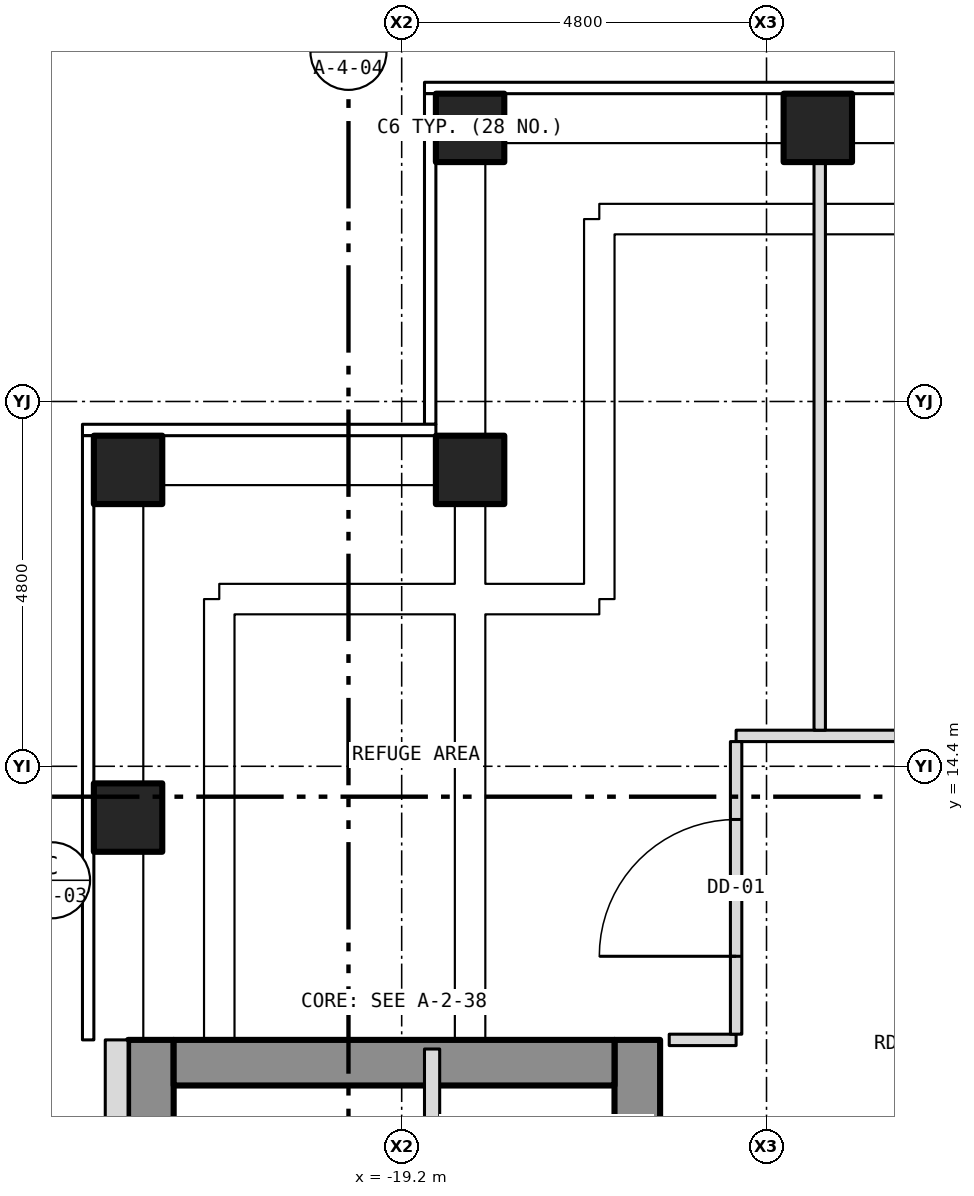
"""IFC4 building model, lengths in metres.
Left out: names, types, materials, properties, quantities, classifications, styles, units other than length and angle.
Written with IfcOpenShell. Run it as: python <this file> out.ifc"""

import sys

from ifc_helpers import new_model, si_unit, direction, frame, frame_2d, origin, origin_2d, place, context, subcontext, project, spatial, rectangle, hollow_rectangle, extrude, element, fill, save


model = new_model("IFC4")
c1 = context("Model", 3, precision=1e-05, world=origin(), true_north=direction((0.0, 1.0)))
c2 = subcontext(c1, "Body", "Model", "MODEL_VIEW")
j1 = project(units=[si_unit("LENGTHUNIT", "METRE"), si_unit("PLANEANGLEUNIT", "RADIAN")], contexts=[c1])
p1 = place(None, origin())
s1 = spatial("IfcSite", under=j1, at=p1, CompositionType="ELEMENT")
p2 = place(p1, origin())
s2 = spatial("IfcBuilding", under=s1, at=p2, CompositionType="ELEMENT")
p3 = place(p2, frame((0.0, 0.0, 138.0)))
s3 = spatial("IfcBuildingStorey", under=s2, at=p3, CompositionType="ELEMENT", Elevation=138.0)
for number, where, z_axis, x_axis in (
    (1, (-18.3, 22.8, -0.3), (0.0, 0.0, 1.0), (1.0, 0.0, 0.0)),
    (2, (-13.725, 22.8, -0.3), (0.0, 0.0, 1.0), (1.0, 0.0, 0.0)),
    (3, (-22.8, 13.725, -0.3), (0.0, 0.0, 1.0), (1.0, 0.0, 0.0)),
    (4, (-22.8, 18.3, -0.3), (0.0, 0.0, 1.0), (1.0, 0.0, 0.0)),
    (5, (-18.3, 18.3, -0.3), (0.0, 0.0, 1.0), (1.0, 0.0, 0.0)),
):
    element("IfcColumn", number, at=place(p3, frame(where, z_axis=z_axis, x_axis=x_axis)), inside=s3, PredefinedType="COLUMN", context=c2, shape_type="SweptSolid", body=[
        extrude(hollow_rectangle(XDim=0.9, YDim=0.9, WallThickness=0.05, at=origin_2d()), origin(), (0.0, 0.0, 1.0), 4.6),
    ])
p4 = place(p3, frame((-16.1, -10.8, 0.0), z_axis=(0.0, 0.0, 1.0), x_axis=(0.0, 1.0, 0.0)))
e6 = element("IfcWall", 6, at=p4, inside=s3, PredefinedType="SHEAR", context=c2, shape_type="SweptSolid", body=[
    extrude(rectangle(XDim=21.6, YDim=0.6, at=frame_2d((10.8, 0.0))), origin(), (0.0, 0.0, 1.0), 3.9),
])
p5 = place(p4, frame((9.4, 0.0, 0.0)))
e7 = element("IfcOpeningElement", 7, at=p5, cuts=e6, PredefinedType="OPENING", context=c2, shape_type="SweptSolid", body=[
    extrude(rectangle(XDim=1.1, YDim=2.1, at=frame_2d((0.55, 1.05))), frame((0.0, 0.312, 0.0), z_axis=(0.0, -1.0, 0.0), x_axis=(1.0, 0.0, 0.0)), (0.0, 0.0, 1.0), 0.624),
])
p6 = place(p4, frame((11.5, 0.0, 0.0)))
e8 = element("IfcOpeningElement", 8, at=p6, cuts=e6, PredefinedType="OPENING", context=c2, shape_type="SweptSolid", body=[
    extrude(rectangle(XDim=1.1, YDim=2.1, at=frame_2d((0.55, 1.05))), frame((0.0, 0.312, 0.0), z_axis=(0.0, -1.0, 0.0), x_axis=(1.0, 0.0, 0.0)), (0.0, 0.0, 1.0), 0.624),
])
p7 = place(p4, frame((0.758, 0.0, 0.0)))
e9 = element("IfcOpeningElement", 9, at=p7, cuts=e6, PredefinedType="OPENING", context=c2, shape_type="SweptSolid", body=[
    extrude(rectangle(XDim=1.1, YDim=2.1, at=frame_2d((0.55, 1.05))), frame((0.0, 0.312, 0.0), z_axis=(0.0, -1.0, 0.0), x_axis=(1.0, 0.0, 0.0)), (0.0, 0.0, 1.0), 0.624),
])
p8 = place(p4, frame((7.5, 0.0, 0.0)))
e10 = element("IfcOpeningElement", 10, at=p8, cuts=e6, PredefinedType="OPENING", context=c2, shape_type="SweptSolid", body=[
    extrude(rectangle(XDim=1.1, YDim=2.1, at=frame_2d((0.55, 1.05))), frame((0.0, 0.312, 0.0), z_axis=(0.0, -1.0, 0.0), x_axis=(1.0, 0.0, 0.0)), (0.0, 0.0, 1.0), 0.624),
])
p9 = place(p3, frame((-22.5, -10.8, 0.0), z_axis=(0.0, 0.0, 1.0), x_axis=(0.0, 1.0, 0.0)))
e11 = element("IfcWall", 11, at=p9, inside=s3, PredefinedType="SHEAR", context=c2, shape_type="SweptSolid", body=[
    extrude(rectangle(XDim=21.6, YDim=0.6, at=frame_2d((10.8, 0.0))), origin(), (0.0, 0.0, 1.0), 3.9),
])
p10 = place(p3, frame((-22.2, 10.5, 0.0), z_axis=(0.0, 0.0, 1.0), x_axis=(1.0, 0.0, 0.0)))
e12 = element("IfcWall", 12, at=p10, inside=s3, PredefinedType="SHEAR", context=c2, shape_type="SweptSolid", body=[
    extrude(rectangle(XDim=5.8, YDim=0.6, at=frame_2d((2.9, 0.0))), origin(), (0.0, 0.0, 1.0), 3.9),
])
p11 = place(p3, frame((-22.95, 10.8, 0.0), z_axis=(0.0, 0.0, 1.0), x_axis=(0.0, -1.0, 0.0)))
e13 = element("IfcWall", 13, at=p11, inside=s3, PredefinedType="SOLIDWALL", context=c2, shape_type="SweptSolid", body=[
    extrude(rectangle(XDim=21.6, YDim=0.3, at=frame_2d((10.8, 0.0))), origin(), (0.0, 0.0, 1.0), 4.5),
])
p12 = place(p11, frame((3.0, 0.0, 2.2)))
e14 = element("IfcOpeningElement", 14, at=p12, cuts=e13, PredefinedType="OPENING", context=c2, shape_type="SweptSolid", body=[
    extrude(rectangle(XDim=1.2, YDim=0.6, at=frame_2d((0.6, 0.3))), frame((0.0, 0.162, 0.0), z_axis=(0.0, -1.0, 0.0), x_axis=(1.0, 0.0, 0.0)), (0.0, 0.0, 1.0), 0.324),
])
p13 = place(p11, frame((7.8, 0.0, 2.2)))
e15 = element("IfcOpeningElement", 15, at=p13, cuts=e13, PredefinedType="OPENING", context=c2, shape_type="SweptSolid", body=[
    extrude(rectangle(XDim=1.2, YDim=0.6, at=frame_2d((0.6, 0.3))), frame((0.0, 0.162, 0.0), z_axis=(0.0, -1.0, 0.0), x_axis=(1.0, 0.0, 0.0)), (0.0, 0.0, 1.0), 0.324),
])
p14 = place(p11, frame((12.6, 0.0, 2.2)))
e16 = element("IfcOpeningElement", 16, at=p14, cuts=e13, PredefinedType="OPENING", context=c2, shape_type="SweptSolid", body=[
    extrude(rectangle(XDim=1.2, YDim=0.6, at=frame_2d((0.6, 0.3))), frame((0.0, 0.162, 0.0), z_axis=(0.0, -1.0, 0.0), x_axis=(1.0, 0.0, 0.0)), (0.0, 0.0, 1.0), 0.324),
])
p15 = place(p11, frame((17.4, 0.0, 2.2)))
e17 = element("IfcOpeningElement", 17, at=p15, cuts=e13, PredefinedType="OPENING", context=c2, shape_type="SweptSolid", body=[
    extrude(rectangle(XDim=1.2, YDim=0.6, at=frame_2d((0.6, 0.3))), frame((0.0, 0.162, 0.0), z_axis=(0.0, -1.0, 0.0), x_axis=(1.0, 0.0, 0.0)), (0.0, 0.0, 1.0), 0.324),
])
p16 = place(p3, frame((-15.68, 10.8, 0.0), z_axis=(0.0, 0.0, 1.0), x_axis=(1.0, 0.0, 0.0)))
e18 = element("IfcWall", 18, at=p16, inside=s3, PredefinedType="PARTITIONING", context=c2, shape_type="SweptSolid", body=[
    extrude(rectangle(XDim=0.88, YDim=0.15, at=frame_2d((0.44, 0.0))), origin(), (0.0, 0.0, 1.0), 4.3),
])
p17 = place(p3, frame((-14.8, 14.8, 0.0), z_axis=(0.0, 0.0, 1.0), x_axis=(1.0, 0.0, 0.0)))
e19 = element("IfcWall", 19, at=p17, inside=s3, PredefinedType="PARTITIONING", context=c2, shape_type="SweptSolid", body=[
    extrude(rectangle(XDim=29.6, YDim=0.15, at=frame_2d((14.8, 0.0))), origin(), (0.0, 0.0, 1.0), 4.3),
])
p18 = place(p17, frame((7.488, 0.0, 0.0)))
e20 = element("IfcOpeningElement", 20, at=p18, cuts=e19, PredefinedType="OPENING", context=c2, shape_type="SweptSolid", body=[
    extrude(rectangle(XDim=0.9, YDim=2.1, at=frame_2d((0.45, 1.05))), frame((0.0, 0.087, 0.0), z_axis=(0.0, -1.0, 0.0), x_axis=(1.0, 0.0, 0.0)), (0.0, 0.0, 1.0), 0.174),
])
p19 = place(p17, frame((21.213, 0.0, 0.0)))
e21 = element("IfcOpeningElement", 21, at=p19, cuts=e19, PredefinedType="OPENING", context=c2, shape_type="SweptSolid", body=[
    extrude(rectangle(XDim=0.9, YDim=2.1, at=frame_2d((0.45, 1.05))), frame((0.0, 0.087, 0.0), z_axis=(0.0, -1.0, 0.0), x_axis=(1.0, 0.0, 0.0)), (0.0, 0.0, 1.0), 0.174),
])
p20 = place(p3, frame((-18.8, -1.8, 0.0), z_axis=(0.0, 0.0, 1.0), x_axis=(0.0, 1.0, 0.0)))
e22 = element("IfcWall", 22, at=p20, inside=s3, PredefinedType="PARTITIONING", context=c2, shape_type="SweptSolid", body=[
    extrude(rectangle(XDim=12.48, YDim=0.2, at=frame_2d((6.24, 0.0))), origin(), (0.0, 0.0, 1.0), 3.9),
])
p21 = place(p3, frame((-14.8, 10.875, 0.0), z_axis=(0.0, 0.0, 1.0), x_axis=(0.0, 1.0, 0.0)))
e23 = element("IfcWall", 23, at=p21, inside=s3, PredefinedType="PARTITIONING", context=c2, shape_type="SweptSolid", body=[
    extrude(rectangle(XDim=3.85, YDim=0.15, at=frame_2d((1.925, 0.0))), origin(), (0.0, 0.0, 1.0), 4.3),
])
p22 = place(p21, frame((1.025, 0.0, 0.0)))
e24 = element("IfcOpeningElement", 24, at=p22, cuts=e23, PredefinedType="OPENING", context=c2, shape_type="SweptSolid", body=[
    extrude(rectangle(XDim=1.8, YDim=2.1, at=frame_2d((0.9, 1.05))), frame((0.0, 0.087, 0.0), z_axis=(0.0, -1.0, 0.0), x_axis=(1.0, 0.0, 0.0)), (0.0, 0.0, 1.0), 0.174),
])
p23 = place(p3, frame((-13.7, 14.875, 0.0), z_axis=(0.0, 0.0, 1.0), x_axis=(0.0, 1.0, 0.0)))
e25 = element("IfcWall", 25, at=p23, inside=s3, PredefinedType="PARTITIONING", context=c2, shape_type="SweptSolid", body=[
    extrude(rectangle(XDim=7.805, YDim=0.15, at=frame_2d((3.902, 0.0))), origin(), (0.0, 0.0, 1.0), 4.3),
])
p24 = place(p22, origin())
e26 = element("IfcDoor", 26, at=p24, inside=s3, OperationType="DOUBLE_DOOR_SINGLE_SWING", PredefinedType="DOOR", context=c2, shape_type="SweptSolid", body=[
    extrude(rectangle(XDim=1.8, YDim=2.1, at=frame_2d((0.9, 1.05))), frame((0.0, 0.025, 0.0), z_axis=(0.0, -1.0, 0.0), x_axis=(1.0, 0.0, 0.0)), (0.0, 0.0, 1.0), 0.05),
])
fill(e24, e26)
save(model, sys.argv[1])
